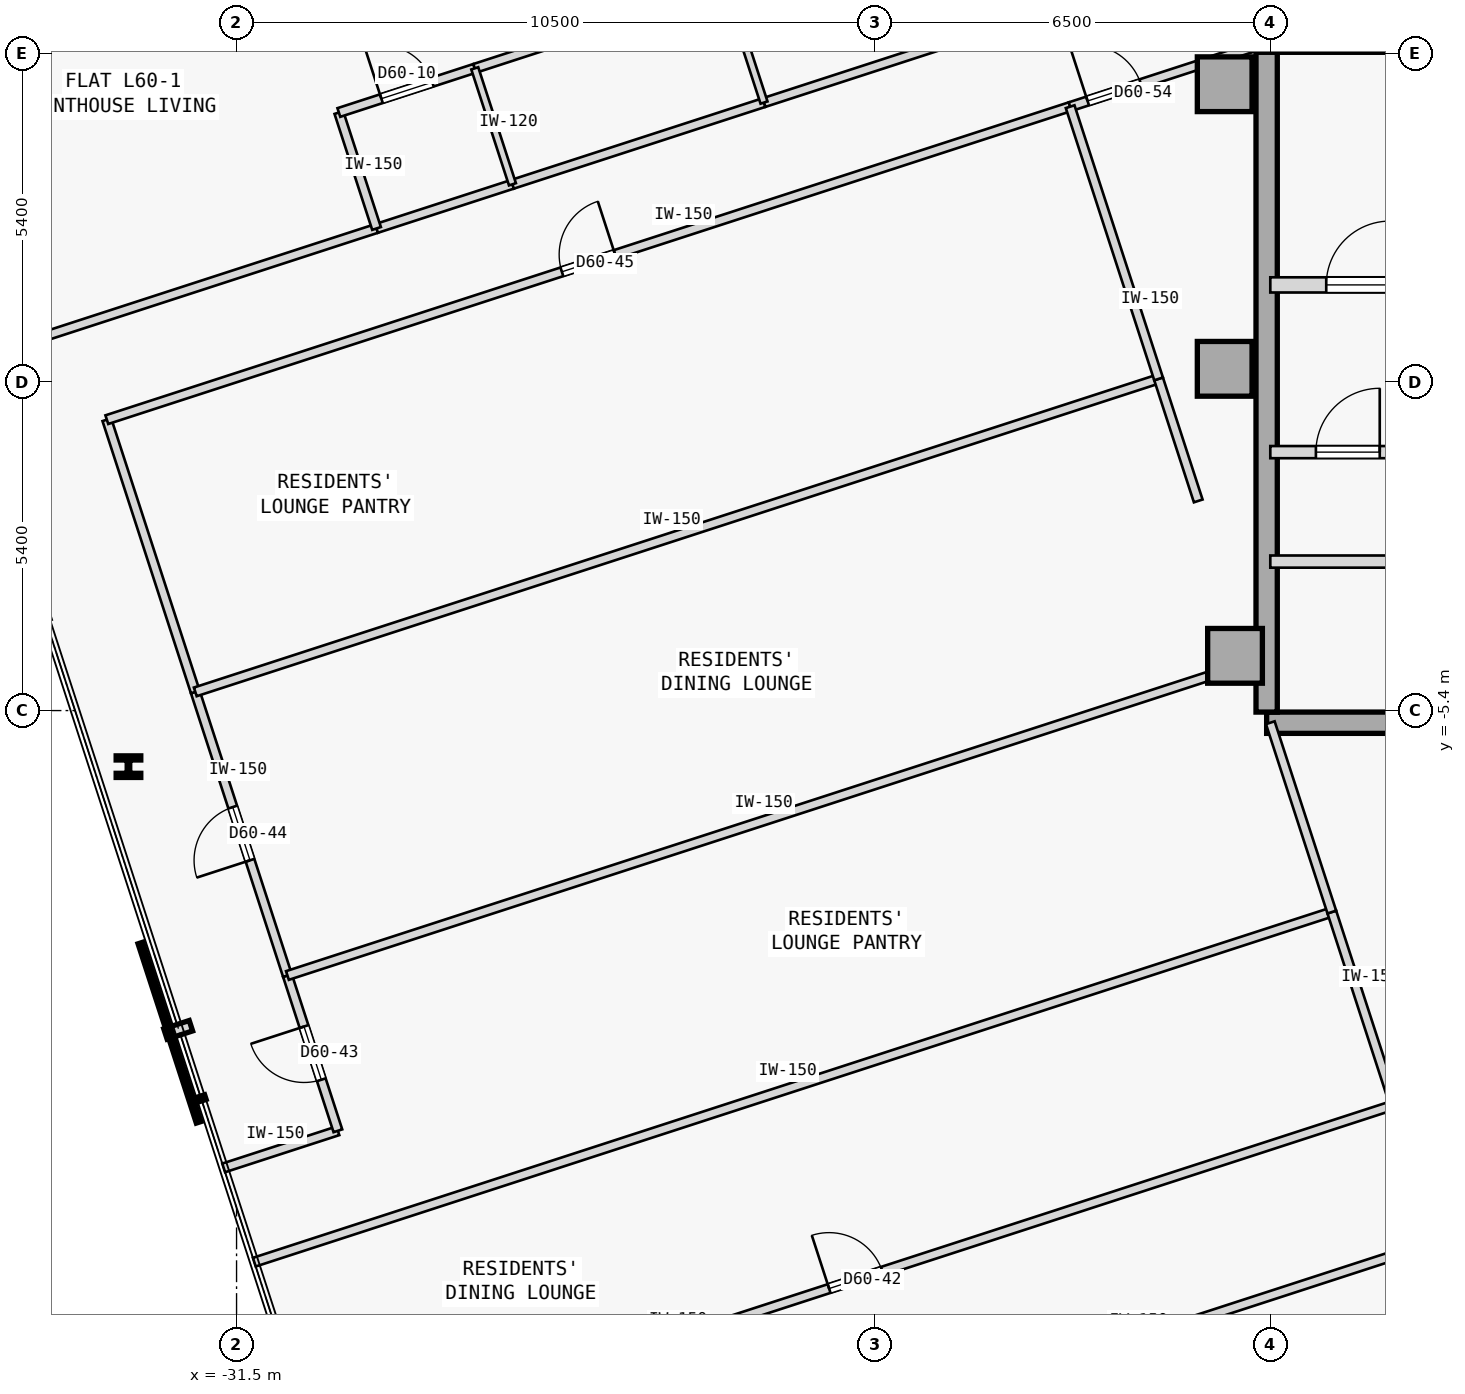
"""IFC4 building model, lengths in metres.
Left out: names, types, materials, properties, quantities, classifications, styles, units other than length and angle.
Written with IfcOpenShell. Run it as: python <this file> out.ifc"""

import sys

from ifc_helpers import new_model, si_unit, direction, frame, frame_2d, origin, origin_2d, place, context, subcontext, project, spatial, rectangle, i_section, extrude, element, fill, save


model = new_model("IFC4")
c1 = context("Model", 3, precision=1e-05, world=origin(), true_north=direction((0.0, 1.0)))
c2 = subcontext(c1, "Body", "Model", "MODEL_VIEW")
j1 = project(units=[si_unit("LENGTHUNIT", "METRE"), si_unit("PLANEANGLEUNIT", "RADIAN")], contexts=[c1])
p1 = place(None, origin())
s1 = spatial("IfcSite", under=j1, at=p1, CompositionType="ELEMENT")
p2 = place(p1, origin())
s2 = spatial("IfcBuilding", under=s1, at=p2, CompositionType="ELEMENT")
p3 = place(p2, frame((0.0, 0.0, 227.65)))
s3 = spatial("IfcBuildingStorey", under=s2, at=p3, CompositionType="ELEMENT", Elevation=227.65)
for number, where, z_axis, x_axis in (
    (1, (-15.25, 4.9, 0.0), (0.0, 0.0, 1.0), (1.0, 0.0, 0.0)),
    (2, (-15.25, 0.22, 0.0), (0.0, 0.0, 1.0), (1.0, 0.0, 0.0)),
    (3, (-15.08, -4.5, 0.0), (0.0, 0.0, 1.0), (1.0, 0.0, 0.0)),
):
    element("IfcColumn", number, at=place(p3, frame(where, z_axis=z_axis, x_axis=x_axis)), inside=s3, PredefinedType="COLUMN", context=c2, shape_type="SweptSolid", body=[
        extrude(rectangle(XDim=0.9, YDim=0.9, at=origin_2d()), origin(), (0.0, 0.0, 1.0), 3.35),
    ])
p4 = place(p3, frame((-14.56, -5.6, 0.0), z_axis=(0.0, 0.0, 1.0), x_axis=(1.0, 0.0, 0.0)))
e4 = element("IfcWall", 4, at=p4, inside=s3, PredefinedType="SHEAR", context=c2, shape_type="SweptSolid", body=[
    extrude(rectangle(XDim=10.86, YDim=0.35, at=frame_2d((5.43, 0.0))), origin(), (0.0, 0.0, 1.0), 3.125),
])
p5 = place(p3, frame((-14.56, -5.425, 0.0), z_axis=(0.0, 0.0, 1.0), x_axis=(0.0, 1.0, 0.0)))
e5 = element("IfcWall", 5, at=p5, inside=s3, PredefinedType="SHEAR", context=c2, shape_type="SweptSolid", body=[
    extrude(rectangle(XDim=10.85, YDim=0.35, at=frame_2d((5.425, 0.0))), origin(), (0.0, 0.0, 1.0), 3.125),
])
p6 = place(p3, frame((-33.278, -6.322, 0.0), z_axis=(0.0, 0.0, 1.0), x_axis=(1.0, 0.0, 0.0)))
e6 = element("IfcColumn", 6, at=p6, inside=s3, PredefinedType="COLUMN", context=c2, shape_type="SweptSolid", body=[
    extrude(i_section(OverallWidth=0.405, OverallDepth=0.355, WebThickness=0.042, FlangeThickness=0.068, FilletRadius=0.015, at=origin_2d()), origin(), (0.0, 0.0, 1.0), 3.35),
])
p7 = place(p3, frame((-14.5, 1.6, 0.0), z_axis=(0.0, 0.0, 1.0), x_axis=(1.0, 0.0, 0.0)))
e7 = element("IfcWall", 7, at=p7, inside=s3, PredefinedType="STANDARD", context=c2, shape_type="SweptSolid", body=[
    extrude(rectangle(XDim=3.6, YDim=0.25, at=frame_2d((1.8, 0.0))), origin(), (0.0, 0.0, 1.0), 3.125),
])
p8 = place(p7, frame((0.92, 0.0, 0.0)))
e8 = element("IfcOpeningElement", 8, at=p8, cuts=e7, PredefinedType="OPENING", context=c2, shape_type="SweptSolid", body=[
    extrude(rectangle(XDim=1.05, YDim=2.15, at=frame_2d((0.525, 1.075))), frame((0.0, 0.135, 0.0), z_axis=(0.0, -1.0, 0.0), x_axis=(1.0, 0.0, 0.0)), (0.0, 0.0, 1.0), 0.27),
])
p9 = place(p3, frame((-14.5, -1.15, 0.0), z_axis=(0.0, 0.0, 1.0), x_axis=(1.0, 0.0, 0.0)))
e9 = element("IfcWall", 9, at=p9, inside=s3, PredefinedType="STANDARD", context=c2, shape_type="SweptSolid", body=[
    extrude(rectangle(XDim=2.95, YDim=0.2, at=frame_2d((1.475, 0.0))), origin(), (0.0, 0.0, 1.0), 3.125),
])
p10 = place(p9, frame((0.75, 0.0, 0.0)))
e10 = element("IfcOpeningElement", 10, at=p10, cuts=e9, PredefinedType="OPENING", context=c2, shape_type="SweptSolid", body=[
    extrude(rectangle(XDim=1.05, YDim=2.18, at=frame_2d((0.525, 1.09))), frame((0.0, 0.11, 0.0), z_axis=(0.0, -1.0, 0.0), x_axis=(1.0, 0.0, 0.0)), (0.0, 0.0, 1.0), 0.22),
])
p11 = place(p3, frame((-14.5, -2.95, 0.0), z_axis=(0.0, 0.0, 1.0), x_axis=(1.0, 0.0, 0.0)))
e11 = element("IfcWall", 11, at=p11, inside=s3, PredefinedType="STANDARD", context=c2, shape_type="SweptSolid", body=[
    extrude(rectangle(XDim=10.8, YDim=0.2, at=frame_2d((5.4, 0.0))), origin(), (0.0, 0.0, 1.0), 3.125),
])
p12 = place(p11, frame((9.17, 0.0, 0.0)))
e12 = element("IfcOpeningElement", 12, at=p12, cuts=e11, PredefinedType="OPENING", context=c2, shape_type="SweptSolid", body=[
    extrude(rectangle(XDim=1.1, YDim=2.15, at=frame_2d((0.55, 1.075))), frame((0.0, 0.11, 0.0), z_axis=(0.0, -1.0, 0.0), x_axis=(1.0, 0.0, 0.0)), (0.0, 0.0, 1.0), 0.22),
])
p13 = place(p11, frame((2.13, 0.0, 0.0)))
e13 = element("IfcOpeningElement", 13, at=p13, cuts=e11, PredefinedType="OPENING", context=c2, shape_type="SweptSolid", body=[
    extrude(rectangle(XDim=0.92, YDim=2.15, at=frame_2d((0.46, 1.075))), frame((0.0, 0.11, 0.0), z_axis=(0.0, -1.0, 0.0), x_axis=(1.0, 0.0, 0.0)), (0.0, 0.0, 1.0), 0.22),
])
p14 = place(p11, frame((6.45, 0.0, 0.0)))
e14 = element("IfcOpeningElement", 14, at=p14, cuts=e11, PredefinedType="OPENING", context=c2, shape_type="SweptSolid", body=[
    extrude(rectangle(XDim=0.92, YDim=2.15, at=frame_2d((0.46, 1.075))), frame((0.0, 0.11, 0.0), z_axis=(0.0, -1.0, 0.0), x_axis=(1.0, 0.0, 0.0)), (0.0, 0.0, 1.0), 0.22),
])
p15 = place(p3, frame((-36.012, 0.314, 0.0), z_axis=(0.0, 0.0, 1.0), x_axis=(0.951054850325, 0.309022121658, 0.0)))
e15 = element("IfcWall", 15, at=p15, inside=s3, PredefinedType="PARTITIONING", context=c2, shape_type="SweptSolid", body=[
    extrude(rectangle(XDim=7.165, YDim=0.15, at=frame_2d((3.583, 0.0))), origin(), (0.0, 0.0, 1.0), 3.125),
])
p16 = place(p3, frame((-29.198, 2.528, 0.0), z_axis=(0.0, 0.0, 1.0), x_axis=(0.951076048914, 0.308956872689, 0.0)))
e16 = element("IfcWall", 16, at=p16, inside=s3, PredefinedType="PARTITIONING", context=c2, shape_type="SweptSolid", body=[
    extrude(rectangle(XDim=2.35, YDim=0.15, at=frame_2d((1.175, 0.0))), origin(), (0.0, 0.0, 1.0), 3.125),
])
p17 = place(p3, frame((-26.963, 3.254, 0.0), z_axis=(0.0, 0.0, 1.0), x_axis=(0.951057987102, 0.309012467661, 0.0)))
e17 = element("IfcWall", 17, at=p17, inside=s3, PredefinedType="PARTITIONING", context=c2, shape_type="SweptSolid", body=[
    extrude(rectangle(XDim=4.35, YDim=0.15, at=frame_2d((2.175, 0.0))), origin(), (0.0, 0.0, 1.0), 3.125),
])
p18 = place(p3, frame((-22.826, 4.599, 0.0), z_axis=(0.0, 0.0, 1.0), x_axis=(0.951055596592, 0.309019824916, 0.0)))
e18 = element("IfcWall", 18, at=p18, inside=s3, PredefinedType="PARTITIONING", context=c2, shape_type="SweptSolid", body=[
    extrude(rectangle(XDim=3.5, YDim=0.15, at=frame_2d((1.75, 0.0))), origin(), (0.0, 0.0, 1.0), 3.125),
])
p19 = place(p3, frame((-14.709, -16.794, 0.0), z_axis=(0.0, 0.0, 1.0), x_axis=(0.951050295235, 0.309036140172, 0.0)))
e19 = element("IfcWall", 19, at=p19, inside=s3, PredefinedType="PARTITIONING", context=c2, shape_type="SweptSolid", body=[
    extrude(rectangle(XDim=6.302, YDim=0.15, at=frame_2d((3.151, 0.0))), origin(), (0.0, 0.0, 1.0), 3.125),
])
p20 = place(p19, frame((2.676, 0.0, 0.0)))
e20 = element("IfcOpeningElement", 20, at=p20, cuts=e19, PredefinedType="OPENING", context=c2, shape_type="SweptSolid", body=[
    extrude(rectangle(XDim=0.95, YDim=2.15, at=frame_2d((0.475, 1.075))), frame((0.0, 0.085, 0.0), z_axis=(0.0, -1.0, 0.0), x_axis=(1.0, 0.0, 0.0)), (0.0, 0.0, 1.0), 0.17),
])
p21 = place(p3, frame((-29.45, -19.881, 0.0), z_axis=(0.0, 0.0, 1.0), x_axis=(0.95105650271, 0.309017036186, 0.0)))
e21 = element("IfcWall", 21, at=p21, inside=s3, PredefinedType="PARTITIONING", context=c2, shape_type="SweptSolid", body=[
    extrude(rectangle(XDim=18.632, YDim=0.15, at=frame_2d((9.316, 0.0))), origin(), (0.0, 0.0, 1.0), 3.125),
])
p22 = place(p21, frame((8.856, 0.0, 0.0)))
e22 = element("IfcOpeningElement", 22, at=p22, cuts=e21, PredefinedType="OPENING", context=c2, shape_type="SweptSolid", body=[
    extrude(rectangle(XDim=0.92, YDim=2.15, at=frame_2d((0.46, 1.075))), frame((0.0, 0.085, 0.0), z_axis=(0.0, -1.0, 0.0), x_axis=(1.0, 0.0, 0.0)), (0.0, 0.0, 1.0), 0.17),
])
p23 = place(p3, frame((-31.712, -12.921, 0.0), z_axis=(0.0, 0.0, 1.0), x_axis=(0.951054051148, 0.309024581215, 0.0)))
e23 = element("IfcWall", 23, at=p23, inside=s3, PredefinedType="PARTITIONING", context=c2, shape_type="SweptSolid", body=[
    extrude(rectangle(XDim=1.975, YDim=0.15, at=frame_2d((0.988, 0.0))), origin(), (0.0, 0.0, 1.0), 3.125),
])
p24 = place(p3, frame((-29.833, -12.311, 0.0), z_axis=(0.0, 0.0, 1.0), x_axis=(-0.309044953986, 0.951047431213, 0.0)))
e24 = element("IfcWall", 24, at=p24, inside=s3, PredefinedType="PARTITIONING", context=c2, shape_type="SweptSolid", body=[
    extrude(rectangle(XDim=2.685, YDim=0.15, at=frame_2d((1.343, 0.0))), origin(), (0.0, 0.0, 1.0), 3.125),
])
p25 = place(p24, frame((0.883, 0.0, 0.0)))
e25 = element("IfcOpeningElement", 25, at=p25, cuts=e24, PredefinedType="OPENING", context=c2, shape_type="SweptSolid", body=[
    extrude(rectangle(XDim=0.92, YDim=2.15, at=frame_2d((0.46, 1.075))), frame((0.0, 0.085, 0.0), z_axis=(0.0, -1.0, 0.0), x_axis=(1.0, 0.0, 0.0)), (0.0, 0.0, 1.0), 0.17),
])
p26 = place(p3, frame((-30.663, -9.757, 0.0), z_axis=(0.0, 0.0, 1.0), x_axis=(-0.309019653166, 0.951055652397, 0.0)))
e26 = element("IfcWall", 26, at=p26, inside=s3, PredefinedType="PARTITIONING", context=c2, shape_type="SweptSolid", body=[
    extrude(rectangle(XDim=4.904, YDim=0.15, at=frame_2d((2.452, 0.0))), origin(), (0.0, 0.0, 1.0), 3.125),
])
p27 = place(p26, frame((1.992, 0.0, 0.0)))
e27 = element("IfcOpeningElement", 27, at=p27, cuts=e26, PredefinedType="OPENING", context=c2, shape_type="SweptSolid", body=[
    extrude(rectangle(XDim=0.92, YDim=2.15, at=frame_2d((0.46, 1.075))), frame((0.0, 0.085, 0.0), z_axis=(0.0, -1.0, 0.0), x_axis=(1.0, 0.0, 0.0)), (0.0, 0.0, 1.0), 0.17),
])
p28 = place(p3, frame((-32.179, -5.093, 0.0), z_axis=(0.0, 0.0, 1.0), x_axis=(-0.309014532869, 0.951057316083, 0.0)))
e28 = element("IfcWall", 28, at=p28, inside=s3, PredefinedType="PARTITIONING", context=c2, shape_type="SweptSolid", body=[
    extrude(rectangle(XDim=4.707, YDim=0.15, at=frame_2d((2.354, 0.0))), origin(), (0.0, 0.0, 1.0), 3.125),
])
p29 = place(p3, frame((-33.633, -0.616, 0.0), z_axis=(0.0, 0.0, 1.0), x_axis=(0.951058192995, 0.309011833974, 0.0)))
e29 = element("IfcWall", 29, at=p29, inside=s3, PredefinedType="PARTITIONING", context=c2, shape_type="SweptSolid", body=[
    extrude(rectangle(XDim=16.657, YDim=0.15, at=frame_2d((8.329, 0.0))), origin(), (0.0, 0.0, 1.0), 3.125),
])
p30 = place(p29, frame((7.868, 0.0, 0.0)))
e30 = element("IfcOpeningElement", 30, at=p30, cuts=e29, PredefinedType="OPENING", context=c2, shape_type="SweptSolid", body=[
    extrude(rectangle(XDim=0.92, YDim=2.15, at=frame_2d((0.46, 1.075))), frame((0.0, 0.085, 0.0), z_axis=(0.0, -1.0, 0.0), x_axis=(1.0, 0.0, 0.0)), (0.0, 0.0, 1.0), 0.17),
])
p31 = place(p3, frame((-17.792, 4.531, 0.0), z_axis=(0.0, 0.0, 1.0), x_axis=(0.951047546178, 0.309044600193, 0.0)))
e31 = element("IfcWall", 31, at=p31, inside=s3, PredefinedType="PARTITIONING", context=c2, shape_type="SweptSolid", body=[
    extrude(rectangle(XDim=3.461, YDim=0.15, at=frame_2d((1.73, 0.0))), origin(), (0.0, 0.0, 1.0), 3.125),
])
p32 = place(p31, frame((0.302, 0.0, 0.0)))
e32 = element("IfcOpeningElement", 32, at=p32, cuts=e31, PredefinedType="OPENING", context=c2, shape_type="SweptSolid", body=[
    extrude(rectangle(XDim=0.92, YDim=2.15, at=frame_2d((0.46, 1.075))), frame((0.0, 0.085, 0.0), z_axis=(0.0, -1.0, 0.0), x_axis=(1.0, 0.0, 0.0)), (0.0, 0.0, 1.0), 0.17),
])
p33 = place(p3, frame((-29.198, 2.528, 0.0), z_axis=(0.0, 0.0, 1.0), x_axis=(-0.308948390121, 0.951078804433, 0.0)))
e33 = element("IfcWall", 33, at=p33, inside=s3, PredefinedType="PARTITIONING", context=c2, shape_type="SweptSolid", body=[
    extrude(rectangle(XDim=2.005, YDim=0.15, at=frame_2d((1.002, 0.0))), origin(), (0.0, 0.0, 1.0), 3.125),
])
p34 = place(p3, frame((-29.817, 4.435, 0.0), z_axis=(0.0, 0.0, 1.0), x_axis=(0.951035595692, 0.309081373955, 0.0)))
e34 = element("IfcWall", 34, at=p34, inside=s3, PredefinedType="PARTITIONING", context=c2, shape_type="SweptSolid", body=[
    extrude(rectangle(XDim=2.35, YDim=0.15, at=frame_2d((1.175, 0.0))), origin(), (0.0, 0.0, 1.0), 3.125),
])
p35 = place(p34, frame((0.735, 0.0, 0.0)))
e35 = element("IfcOpeningElement", 35, at=p35, cuts=e34, PredefinedType="OPENING", context=c2, shape_type="SweptSolid", body=[
    extrude(rectangle(XDim=0.88, YDim=2.15, at=frame_2d((0.44, 1.075))), frame((0.0, 0.085, 0.0), z_axis=(0.0, -1.0, 0.0), x_axis=(1.0, 0.0, 0.0)), (0.0, 0.0, 1.0), 0.17),
])
p36 = place(p3, frame((-27.583, 5.161, 0.0), z_axis=(0.0, 0.0, 1.0), x_axis=(0.951057987102, 0.309012467661, 0.0)))
e36 = element("IfcWall", 36, at=p36, inside=s3, PredefinedType="PARTITIONING", context=c2, shape_type="SweptSolid", body=[
    extrude(rectangle(XDim=4.35, YDim=0.15, at=frame_2d((2.175, 0.0))), origin(), (0.0, 0.0, 1.0), 3.125),
])
p37 = place(p36, frame((1.725, 0.0, 0.0)))
e37 = element("IfcOpeningElement", 37, at=p37, cuts=e36, PredefinedType="OPENING", context=c2, shape_type="SweptSolid", body=[
    extrude(rectangle(XDim=0.9, YDim=2.15, at=frame_2d((0.45, 1.075))), frame((0.0, 0.085, 0.0), z_axis=(0.0, -1.0, 0.0), x_axis=(1.0, 0.0, 0.0)), (0.0, 0.0, 1.0), 0.17),
])
for number, where, z_axis, x_axis in (
    (38, (-26.963, 3.254, 0.0), (0.0, 0.0, 1.0), (-0.309, 0.951, 0.0)),
    (39, (-22.826, 4.599, 0.0), (0.0, 0.0, 1.0), (-0.309, 0.951, 0.0)),
):
    element("IfcWall", number, at=place(p3, frame(where, z_axis=z_axis, x_axis=x_axis)), inside=s3, PredefinedType="PARTITIONING", context=c2, shape_type="SweptSolid", body=[
        extrude(rectangle(XDim=2.005, YDim=0.12, at=frame_2d((1.002, 0.0))), origin(), (0.0, 0.0, 1.0), 3.125),
    ])
p38 = place(p3, frame((-30.178, -17.642, 0.0), z_axis=(0.0, 0.0, 1.0), x_axis=(0.95105650271, 0.309017036186, 0.0)))
e40 = element("IfcWall", 40, at=p38, inside=s3, PredefinedType="PARTITIONING", context=c2, shape_type="SweptSolid", body=[
    extrude(rectangle(XDim=18.632, YDim=0.15, at=frame_2d((9.316, 0.0))), origin(), (0.0, 0.0, 1.0), 3.125),
])
p39 = place(p38, frame((8.856, 0.0, 0.0)))
e41 = element("IfcOpeningElement", 41, at=p39, cuts=e40, PredefinedType="OPENING", context=c2, shape_type="SweptSolid", body=[
    extrude(rectangle(XDim=0.92, YDim=2.15, at=frame_2d((0.46, 1.075))), frame((0.0, 0.085, 0.0), z_axis=(0.0, -1.0, 0.0), x_axis=(1.0, 0.0, 0.0)), (0.0, 0.0, 1.0), 0.17),
])
p40 = place(p3, frame((-31.208, -14.471, 0.0), z_axis=(0.0, 0.0, 1.0), x_axis=(0.951057753948, 0.309013185244, 0.0)))
e42 = element("IfcWall", 42, at=p40, inside=s3, PredefinedType="PARTITIONING", context=c2, shape_type="SweptSolid", body=[
    extrude(rectangle(XDim=18.632, YDim=0.15, at=frame_2d((9.316, 0.0))), origin(), (0.0, 0.0, 1.0), 3.125),
])
p41 = place(p3, frame((-12.458, -11.884, 0.0), z_axis=(0.0, 0.0, 1.0), x_axis=(-0.308946982245, 0.951079261766, 0.0)))
e43 = element("IfcWall", 43, at=p41, inside=s3, PredefinedType="PARTITIONING", context=c2, shape_type="SweptSolid", body=[
    extrude(rectangle(XDim=3.334, YDim=0.15, at=frame_2d((1.667, 0.0))), origin(), (0.0, 0.0, 1.0), 3.125),
])
p42 = place(p3, frame((-30.663, -9.757, 0.0), z_axis=(0.0, 0.0, 1.0), x_axis=(0.951058192995, 0.309011833974, 0.0)))
e44 = element("IfcWall", 44, at=p42, inside=s3, PredefinedType="PARTITIONING", context=c2, shape_type="SweptSolid", body=[
    extrude(rectangle(XDim=16.657, YDim=0.15, at=frame_2d((8.329, 0.0))), origin(), (0.0, 0.0, 1.0), 3.125),
])
p43 = place(p3, frame((-13.488, -8.713, 0.0), z_axis=(0.0, 0.0, 1.0), x_axis=(-0.309082700143, 0.951035164687, 0.0)))
e45 = element("IfcWall", 45, at=p43, inside=s3, PredefinedType="PARTITIONING", context=c2, shape_type="SweptSolid", body=[
    extrude(rectangle(XDim=3.274, YDim=0.15, at=frame_2d((1.637, 0.0))), origin(), (0.0, 0.0, 1.0), 3.125),
])
p44 = place(p3, frame((-32.179, -5.093, 0.0), z_axis=(0.0, 0.0, 1.0), x_axis=(0.951053885426, 0.309025091239, 0.0)))
e46 = element("IfcWall", 46, at=p44, inside=s3, PredefinedType="PARTITIONING", context=c2, shape_type="SweptSolid", body=[
    extrude(rectangle(XDim=16.657, YDim=0.15, at=frame_2d((8.329, 0.0))), origin(), (0.0, 0.0, 1.0), 3.125),
])
p45 = place(p3, frame((-15.685, -1.952, 0.0), z_axis=(0.0, 0.0, 1.0), x_axis=(-0.308929092959, 0.951085072706, 0.0)))
e47 = element("IfcWall", 47, at=p45, inside=s3, PredefinedType="PARTITIONING", context=c2, shape_type="SweptSolid", body=[
    extrude(rectangle(XDim=2.11, YDim=0.15, at=frame_2d((1.055, 0.0))), origin(), (0.0, 0.0, 1.0), 3.125),
])
p46 = place(p3, frame((-16.337, 0.054, 0.0), z_axis=(0.0, 0.0, 1.0), x_axis=(-0.309029776355, 0.951052363083, 0.0)))
e48 = element("IfcWall", 48, at=p46, inside=s3, PredefinedType="PARTITIONING", context=c2, shape_type="SweptSolid", body=[
    extrude(rectangle(XDim=4.707, YDim=0.15, at=frame_2d((2.354, 0.0))), origin(), (0.0, 0.0, 1.0), 3.125),
])
p47 = place(p8, origin())
e49 = element("IfcDoor", 49, at=p47, inside=s3, OperationType="SINGLE_SWING_RIGHT", PredefinedType="DOOR", context=c2, shape_type="SweptSolid", body=[
    extrude(rectangle(XDim=1.05, YDim=2.15, at=frame_2d((0.525, 1.075))), frame((0.0, 0.025, 0.0), z_axis=(0.0, -1.0, 0.0), x_axis=(1.0, 0.0, 0.0)), (0.0, 0.0, 1.0), 0.05),
])
fill(e8, e49)
p48 = place(p10, origin())
e50 = element("IfcDoor", 50, at=p48, inside=s3, OperationType="SINGLE_SWING_RIGHT", PredefinedType="DOOR", context=c2, shape_type="SweptSolid", body=[
    extrude(rectangle(XDim=1.05, YDim=2.18, at=frame_2d((0.525, 1.09))), frame((0.0, 0.025, 0.0), z_axis=(0.0, -1.0, 0.0), x_axis=(1.0, 0.0, 0.0)), (0.0, 0.0, 1.0), 0.05),
])
fill(e10, e50)
p49 = place(p35, origin())
e51 = element("IfcDoor", 51, at=p49, inside=s3, OperationType="SINGLE_SWING_LEFT", PredefinedType="DOOR", context=c2, shape_type="SweptSolid", body=[
    extrude(rectangle(XDim=0.88, YDim=2.15, at=frame_2d((0.44, 1.075))), frame((0.0, 0.025, 0.0), z_axis=(0.0, -1.0, 0.0), x_axis=(1.0, 0.0, 0.0)), (0.0, 0.0, 1.0), 0.05),
])
fill(e35, e51)
p50 = place(p39, origin())
e52 = element("IfcDoor", 52, at=p50, inside=s3, OperationType="SINGLE_SWING_LEFT", PredefinedType="DOOR", context=c2, shape_type="SweptSolid", body=[
    extrude(rectangle(XDim=0.92, YDim=2.15, at=frame_2d((0.46, 1.075))), frame((0.0, 0.025, 0.0), z_axis=(0.0, -1.0, 0.0), x_axis=(1.0, 0.0, 0.0)), (0.0, 0.0, 1.0), 0.05),
])
fill(e41, e52)
p51 = place(p25, origin())
e53 = element("IfcDoor", 53, at=p51, inside=s3, OperationType="SINGLE_SWING_RIGHT", PredefinedType="DOOR", context=c2, shape_type="SweptSolid", body=[
    extrude(rectangle(XDim=0.92, YDim=2.15, at=frame_2d((0.46, 1.075))), frame((0.0, 0.025, 0.0), z_axis=(0.0, -1.0, 0.0), x_axis=(1.0, 0.0, 0.0)), (0.0, 0.0, 1.0), 0.05),
])
fill(e25, e53)
p52 = place(p27, origin())
e54 = element("IfcDoor", 54, at=p52, inside=s3, OperationType="SINGLE_SWING_LEFT", PredefinedType="DOOR", context=c2, shape_type="SweptSolid", body=[
    extrude(rectangle(XDim=0.92, YDim=2.15, at=frame_2d((0.46, 1.075))), frame((0.0, 0.025, 0.0), z_axis=(0.0, -1.0, 0.0), x_axis=(1.0, 0.0, 0.0)), (0.0, 0.0, 1.0), 0.05),
])
fill(e27, e54)
p53 = place(p30, origin())
e55 = element("IfcDoor", 55, at=p53, inside=s3, OperationType="SINGLE_SWING_RIGHT", PredefinedType="DOOR", context=c2, shape_type="SweptSolid", body=[
    extrude(rectangle(XDim=0.92, YDim=2.15, at=frame_2d((0.46, 1.075))), frame((0.0, 0.025, 0.0), z_axis=(0.0, -1.0, 0.0), x_axis=(1.0, 0.0, 0.0)), (0.0, 0.0, 1.0), 0.05),
])
fill(e30, e55)
p54 = place(p32, origin())
e56 = element("IfcDoor", 56, at=p54, inside=s3, OperationType="SINGLE_SWING_LEFT", PredefinedType="DOOR", context=c2, shape_type="SweptSolid", body=[
    extrude(rectangle(XDim=0.92, YDim=2.15, at=frame_2d((0.46, 1.075))), frame((0.0, 0.025, 0.0), z_axis=(0.0, -1.0, 0.0), x_axis=(1.0, 0.0, 0.0)), (0.0, 0.0, 1.0), 0.05),
])
fill(e32, e56)
save(model, sys.argv[1])
